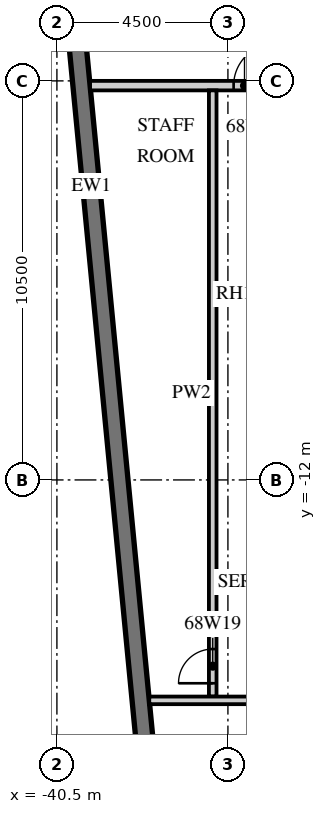
"""IFC4 building model, lengths in metres.
Left out: names, types, materials, properties, quantities, classifications, styles, units other than length and angle.
Written with IfcOpenShell. Run it as: python <this file> out.ifc"""

import sys

from ifc_helpers import new_model, si_unit, direction, frame, frame_2d, origin, place, context, subcontext, project, spatial, rectangle, extrude, element, fill, save


model = new_model("IFC4")
c1 = context("Model", 3, precision=1e-05, world=origin(), true_north=direction((0.0, 1.0)))
c2 = subcontext(c1, "Body", "Model", "MODEL_VIEW")
j1 = project(units=[si_unit("LENGTHUNIT", "METRE"), si_unit("PLANEANGLEUNIT", "RADIAN")], contexts=[c1])
p1 = place(None, origin())
s1 = spatial("IfcSite", under=j1, at=p1, CompositionType="ELEMENT")
p2 = place(p1, origin())
s2 = spatial("IfcBuilding", under=s1, at=p2, CompositionType="ELEMENT")
p3 = place(p2, frame((0.0, 0.0, 275.1)))
s3 = spatial("IfcBuildingStorey", under=s2, at=p3, CompositionType="ELEMENT", Elevation=275.1)
p4 = place(p3, frame((-41.132, 11.658, 0.0), z_axis=(0.0, 0.0, 1.0), x_axis=(0.095847749461, -0.995396006082, 0.0)))
e1 = element("IfcWall", 1, at=p4, inside=s3, PredefinedType="SOLIDWALL", context=c2, shape_type="SweptSolid", body=[
    extrude(rectangle(XDim=32.0, YDim=0.45, at=frame_2d((16.0, 0.0))), origin(), (0.0, 0.0, 1.0), 3.02),
])
p5 = place(p4, frame((2.053, 0.0, 0.45)))
e2 = element("IfcOpeningElement", 2, at=p5, cuts=e1, PredefinedType="OPENING", context=c2, shape_type="SweptSolid", body=[
    extrude(rectangle(XDim=3.3, YDim=2.25, at=frame_2d((1.65, 1.125))), frame((0.0, 0.235, 0.0), z_axis=(0.0, -1.0, 0.0), x_axis=(1.0, 0.0, 0.0)), (0.0, 0.0, 1.0), 0.47),
])
p6 = place(p4, frame((6.574, 0.0, 0.45)))
e3 = element("IfcOpeningElement", 3, at=p6, cuts=e1, PredefinedType="OPENING", context=c2, shape_type="SweptSolid", body=[
    extrude(rectangle(XDim=3.3, YDim=2.25, at=frame_2d((1.65, 1.125))), frame((0.0, 0.235, 0.0), z_axis=(0.0, -1.0, 0.0), x_axis=(1.0, 0.0, 0.0)), (0.0, 0.0, 1.0), 0.47),
])
p7 = place(p3, frame((-39.627, -1.625, 0.0), z_axis=(0.0, 0.0, 1.0), x_axis=(1.0, 0.0, 0.0)))
e4 = element("IfcWall", 4, at=p7, inside=s3, PredefinedType="PARTITIONING", context=c2, shape_type="SweptSolid", body=[
    extrude(rectangle(XDim=8.127, YDim=0.25, at=frame_2d((4.063, 0.0))), origin(), (0.0, 0.0, 1.0), 3.02),
])
p8 = place(p7, frame((6.202, 0.0, 0.0)))
e5 = element("IfcOpeningElement", 5, at=p8, cuts=e4, PredefinedType="OPENING", context=c2, shape_type="SweptSolid", body=[
    extrude(rectangle(XDim=1.3, YDim=2.1, at=frame_2d((0.65, 1.05))), frame((0.0, 0.135, 0.0), z_axis=(0.0, -1.0, 0.0), x_axis=(1.0, 0.0, 0.0)), (0.0, 0.0, 1.0), 0.27),
])
p9 = place(p7, frame((3.777, 0.0, 0.0)))
e6 = element("IfcOpeningElement", 6, at=p9, cuts=e4, PredefinedType="OPENING", context=c2, shape_type="SweptSolid", body=[
    extrude(rectangle(XDim=1.1, YDim=2.1, at=frame_2d((0.55, 1.05))), frame((0.0, 0.135, 0.0), z_axis=(0.0, -1.0, 0.0), x_axis=(1.0, 0.0, 0.0)), (0.0, 0.0, 1.0), 0.27),
])
p10 = place(p3, frame((-36.4, -17.7, 0.0), z_axis=(0.0, 0.0, 1.0), x_axis=(0.0, 1.0, 0.0)))
e7 = element("IfcWall", 7, at=p10, inside=s3, PredefinedType="PARTITIONING", context=c2, shape_type="SweptSolid", body=[
    extrude(rectangle(XDim=15.95, YDim=0.2, at=frame_2d((7.975, 0.0))), origin(), (0.0, 0.0, 1.0), 3.02),
])
p11 = place(p10, frame((0.35, 0.0, 0.0)))
e8 = element("IfcOpeningElement", 8, at=p11, cuts=e7, PredefinedType="OPENING", context=c2, shape_type="SweptSolid", body=[
    extrude(rectangle(XDim=0.9, YDim=2.1, at=frame_2d((0.45, 1.05))), frame((0.0, 0.11, 0.0), z_axis=(0.0, -1.0, 0.0), x_axis=(1.0, 0.0, 0.0)), (0.0, 0.0, 1.0), 0.22),
])
p12 = place(p3, frame((-38.07, -17.8, 0.0), z_axis=(0.0, 0.0, 1.0), x_axis=(1.0, 0.0, 0.0)))
e9 = element("IfcWall", 9, at=p12, inside=s3, PredefinedType="PARTITIONING", context=c2, shape_type="SweptSolid", body=[
    extrude(rectangle(XDim=24.47, YDim=0.2, at=frame_2d((12.235, 0.0))), origin(), (0.0, 0.0, 1.0), 3.02),
])
p13 = place(p12, frame((5.757, 0.0, 0.0)))
e10 = element("IfcOpeningElement", 10, at=p13, cuts=e9, PredefinedType="OPENING", context=c2, shape_type="SweptSolid", body=[
    extrude(rectangle(XDim=0.9, YDim=2.1, at=frame_2d((0.45, 1.05))), frame((0.0, 0.11, 0.0), z_axis=(0.0, -1.0, 0.0), x_axis=(1.0, 0.0, 0.0)), (0.0, 0.0, 1.0), 0.22),
])
p14 = place(p12, frame((14.057, 0.0, 0.0)))
e11 = element("IfcOpeningElement", 11, at=p14, cuts=e9, PredefinedType="OPENING", context=c2, shape_type="SweptSolid", body=[
    extrude(rectangle(XDim=0.9, YDim=2.1, at=frame_2d((0.45, 1.05))), frame((0.0, 0.11, 0.0), z_axis=(0.0, -1.0, 0.0), x_axis=(1.0, 0.0, 0.0)), (0.0, 0.0, 1.0), 0.22),
])
p15 = place(p9, origin())
e12 = element("IfcDoor", 12, at=p15, inside=s3, OperationType="SINGLE_SWING_RIGHT", PredefinedType="DOOR", context=c2, shape_type="SweptSolid", body=[
    extrude(rectangle(XDim=1.1, YDim=2.1, at=frame_2d((0.55, 1.05))), frame((0.0, 0.025, 0.0), z_axis=(0.0, -1.0, 0.0), x_axis=(1.0, 0.0, 0.0)), (0.0, 0.0, 1.0), 0.05),
])
fill(e6, e12)
p16 = place(p11, origin())
e13 = element("IfcDoor", 13, at=p16, inside=s3, OperationType="SINGLE_SWING_LEFT", PredefinedType="DOOR", context=c2, shape_type="SweptSolid", body=[
    extrude(rectangle(XDim=0.9, YDim=2.1, at=frame_2d((0.45, 1.05))), frame((0.0, 0.025, 0.0), z_axis=(0.0, -1.0, 0.0), x_axis=(1.0, 0.0, 0.0)), (0.0, 0.0, 1.0), 0.05),
])
fill(e8, e13)
save(model, sys.argv[1])
